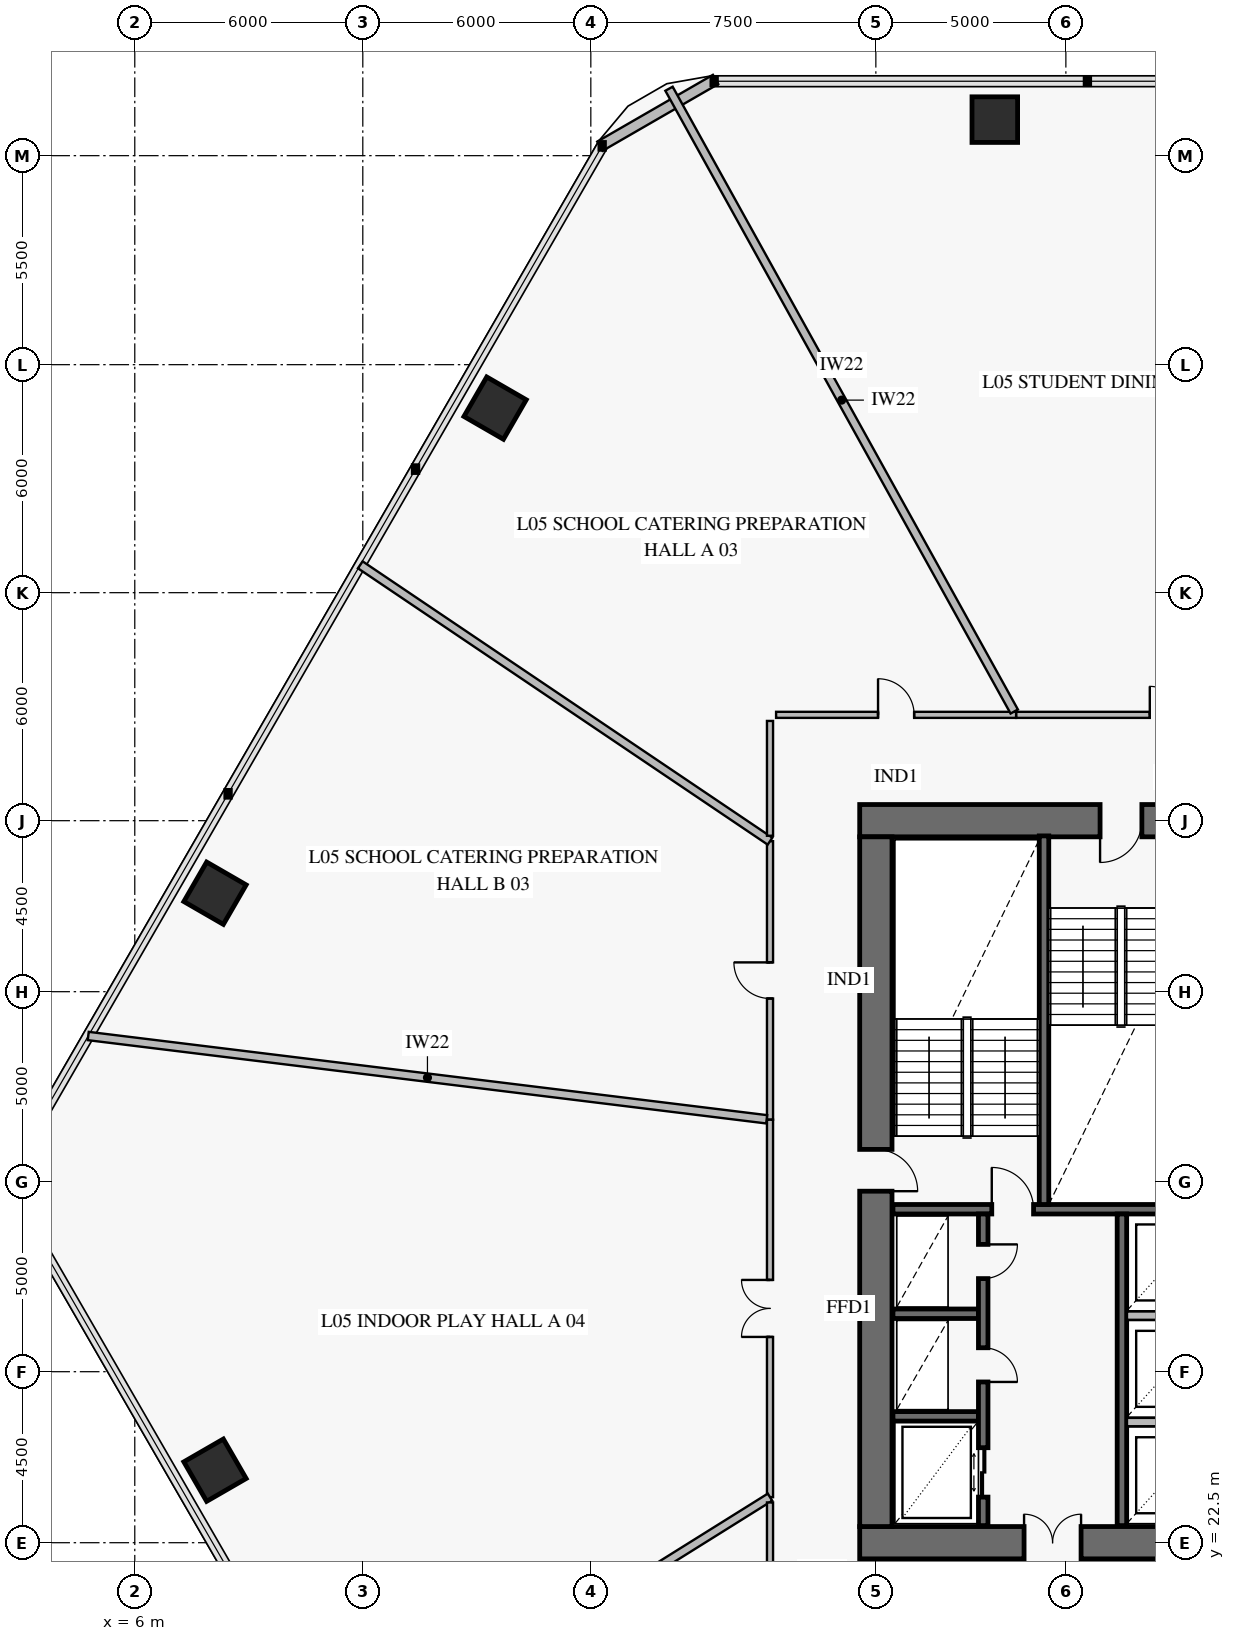
"""IFC4 building model, lengths in metres.
Left out: names, types, materials, properties, quantities, classifications, styles, units other than length and angle.
Written with IfcOpenShell. Run it as: python <this file> out.ifc"""

import sys

from ifc_helpers import new_model, si_unit, direction, frame, frame_2d, origin, origin_2d, place, context, subcontext, project, spatial, rectangle, extrude, element, fill, save


model = new_model("IFC4")
c1 = context("Model", 3, precision=1e-05, world=origin(), true_north=direction((0.0, 1.0)))
c2 = subcontext(c1, "Body", "Model", "MODEL_VIEW")
j1 = project(units=[si_unit("LENGTHUNIT", "METRE"), si_unit("PLANEANGLEUNIT", "RADIAN")], contexts=[c1])
p1 = place(None, origin())
s1 = spatial("IfcSite", under=j1, at=p1, CompositionType="ELEMENT")
p2 = place(p1, origin())
s2 = spatial("IfcBuilding", under=s1, at=p2, CompositionType="ELEMENT")
p3 = place(p2, frame((0.0, 0.0, 20.4)))
s3 = spatial("IfcBuildingStorey", under=s2, at=p3, CompositionType="ELEMENT", Elevation=20.4)
p4 = place(p3, frame((25.075, 22.5, 0.0), z_axis=(0.0, 0.0, 1.0), x_axis=(1.0, 0.0, 0.0)))
e1 = element("IfcWall", 1, at=p4, inside=s3, PredefinedType="SHEAR", context=c2, shape_type="SweptSolid", body=[
    extrude(rectangle(XDim=9.975, YDim=0.85, at=frame_2d((4.988, 0.0))), origin(), (0.0, 0.0, 1.0), 4.2),
])
p5 = place(p4, frame((4.325, 0.0, 0.0)))
e2 = element("IfcOpeningElement", 2, at=p5, cuts=e1, PredefinedType="OPENING", context=c2, shape_type="SweptSolid", body=[
    extrude(rectangle(XDim=1.5, YDim=2.15, at=frame_2d((0.75, 1.075))), frame((0.0, 0.437, 0.0), z_axis=(0.0, -1.0, 0.0), x_axis=(1.0, 0.0, 0.0)), (0.0, 0.0, 1.0), 0.874),
])
p6 = place(p3, frame((36.75, 41.5, 0.0), z_axis=(0.0, 0.0, 1.0), x_axis=(-1.0, 0.0, 0.0)))
e3 = element("IfcWall", 3, at=p6, inside=s3, PredefinedType="SHEAR", context=c2, shape_type="SweptSolid", body=[
    extrude(rectangle(XDim=11.675, YDim=0.85, at=frame_2d((5.837, 0.0))), origin(), (0.0, 0.0, 1.0), 4.2),
])
p7 = place(p6, frame((4.25, 0.0, 0.0)))
e4 = element("IfcOpeningElement", 4, at=p7, cuts=e3, PredefinedType="OPENING", context=c2, shape_type="SweptSolid", body=[
    extrude(rectangle(XDim=1.1, YDim=2.15, at=frame_2d((0.55, 1.075))), frame((0.0, 0.437, 0.0), z_axis=(0.0, -1.0, 0.0), x_axis=(1.0, 0.0, 0.0)), (0.0, 0.0, 1.0), 0.874),
])
p8 = place(p3, frame((25.5, 22.925, 0.0), z_axis=(0.0, 0.0, 1.0), x_axis=(0.0, 1.0, 0.0)))
e5 = element("IfcWall", 5, at=p8, inside=s3, PredefinedType="SHEAR", context=c2, shape_type="SweptSolid", body=[
    extrude(rectangle(XDim=18.15, YDim=0.85, at=frame_2d((9.075, 0.0))), origin(), (0.0, 0.0, 1.0), 4.2),
])
p9 = place(p8, frame((8.825, 0.0, 0.0)))
e6 = element("IfcOpeningElement", 6, at=p9, cuts=e5, PredefinedType="OPENING", context=c2, shape_type="SweptSolid", body=[
    extrude(rectangle(XDim=1.1, YDim=2.15, at=frame_2d((0.55, 1.075))), frame((0.0, 0.437, 0.0), z_axis=(0.0, -1.0, 0.0), x_axis=(1.0, 0.0, 0.0)), (0.0, 0.0, 1.0), 0.874),
])
for number, where, z_axis, x_axis in (
    (7, (28.63, 59.948, 0.0), (0.0, 0.0, 1.0), (-1.0, 0.0, 0.0)),
    (8, (15.481, 52.357, 0.0), (0.0, 0.0, 1.0), (-0.5, -0.866, 0.0)),
    (9, (8.111, 39.592, 0.0), (0.0, 0.0, 1.0), (-0.5, -0.866, 0.0)),
    (10, (8.111, 24.408, 0.0), (0.0, 0.0, 1.0), (0.5, -0.866, 0.0)),
):
    element("IfcColumn", number, at=place(p3, frame(where, z_axis=z_axis, x_axis=x_axis)), inside=s3, PredefinedType="COLUMN", context=c2, shape_type="SweptSolid", body=[
        extrude(rectangle(XDim=1.2, YDim=1.2, at=origin_2d()), origin(), (0.0, 0.0, 1.0), 3.92),
    ])
p10 = place(p3, frame((18.239, 59.249, 0.0), z_axis=(0.0, 0.0, 1.0), x_axis=(0.866007452331, 0.500031091541, 0.0)))
e11 = element("IfcWall", 11, at=p10, inside=s3, PredefinedType="SOLIDWALL", context=c2, shape_type="SweptSolid", body=[
    extrude(rectangle(XDim=3.515, YDim=0.28, at=frame_2d((1.757, 0.0))), origin(), (0.0, 0.0, 1.0), 3.92),
])
p11 = place(p3, frame((25.95, 31.275, 0.0), z_axis=(0.0, 0.0, 1.0), x_axis=(1.0, 0.0, 0.0)))
e12 = element("IfcWall", 12, at=p11, inside=s3, PredefinedType="SOLIDWALL", context=c2, shape_type="SweptSolid", body=[
    extrude(rectangle(XDim=20.1, YDim=0.25, at=frame_2d((10.05, 0.0))), origin(), (0.0, 0.0, 1.0), 4.2),
])
p12 = place(p11, frame((2.6, 0.0, 0.0)))
e13 = element("IfcOpeningElement", 13, at=p12, cuts=e12, PredefinedType="OPENING", context=c2, shape_type="SweptSolid", body=[
    extrude(rectangle(XDim=1.1, YDim=2.15, at=frame_2d((0.55, 1.075))), frame((0.0, 0.137, 0.0), z_axis=(0.0, -1.0, 0.0), x_axis=(1.0, 0.0, 0.0)), (0.0, 0.0, 1.0), 0.274),
])
p13 = place(p11, frame((10.6, 0.0, 0.0)))
e14 = element("IfcOpeningElement", 14, at=p13, cuts=e12, PredefinedType="OPENING", context=c2, shape_type="SweptSolid", body=[
    extrude(rectangle(XDim=1.1, YDim=2.15, at=frame_2d((0.55, 1.075))), frame((0.0, 0.137, 0.0), z_axis=(0.0, -1.0, 0.0), x_axis=(1.0, 0.0, 0.0)), (0.0, 0.0, 1.0), 0.274),
])
p14 = place(p11, frame((16.35, 0.0, 0.0)))
e15 = element("IfcOpeningElement", 15, at=p14, cuts=e12, PredefinedType="OPENING", context=c2, shape_type="SweptSolid", body=[
    extrude(rectangle(XDim=1.1, YDim=2.15, at=frame_2d((0.55, 1.075))), frame((0.0, 0.137, 0.0), z_axis=(0.0, -1.0, 0.0), x_axis=(1.0, 0.0, 0.0)), (0.0, 0.0, 1.0), 0.274),
])
p15 = place(p3, frame((29.925, 31.4, 0.0), z_axis=(0.0, 0.0, 1.0), x_axis=(0.0, 1.0, 0.0)))
e16 = element("IfcWall", 16, at=p15, inside=s3, PredefinedType="SOLIDWALL", context=c2, shape_type="SweptSolid", body=[
    extrude(rectangle(XDim=9.7, YDim=0.25, at=frame_2d((4.85, 0.0))), origin(), (0.0, 0.0, 1.0), 4.2),
])
for number, where, z_axis, x_axis in (
    (17, (25.95, 25.825, 0.0), (0.0, 0.0, 1.0), (1.0, 0.0, 0.0)),
    (18, (25.95, 28.525, 0.0), (0.0, 0.0, 1.0), (1.0, 0.0, 0.0)),
):
    element("IfcWall", number, at=place(p3, frame(where, z_axis=z_axis, x_axis=x_axis)), inside=s3, PredefinedType="SOLIDWALL", context=c2, shape_type="SweptSolid", body=[
        extrude(rectangle(XDim=2.25, YDim=0.25, at=frame_2d((1.125, 0.0))), origin(), (0.0, 0.0, 1.0), 4.2),
    ])
p16 = place(p3, frame((28.325, 22.95, 0.0), z_axis=(0.0, 0.0, 1.0), x_axis=(0.0, 1.0, 0.0)))
e19 = element("IfcWall", 19, at=p16, inside=s3, PredefinedType="SOLIDWALL", context=c2, shape_type="SweptSolid", body=[
    extrude(rectangle(XDim=8.2, YDim=0.25, at=frame_2d((4.1, 0.0))), origin(), (0.0, 0.0, 1.0), 4.2),
])
p17 = place(p16, frame((0.75, 0.0, 0.0)))
e20 = element("IfcOpeningElement", 20, at=p17, cuts=e19, PredefinedType="OPENING", context=c2, shape_type="SweptSolid", body=[
    extrude(rectangle(XDim=1.3, YDim=2.3, at=frame_2d((0.65, 1.15))), frame((0.0, 0.137, 0.0), z_axis=(0.0, -1.0, 0.0), x_axis=(1.0, 0.0, 0.0)), (0.0, 0.0, 1.0), 0.274),
])
p18 = place(p16, frame((3.78, 0.0, 0.0)))
e21 = element("IfcOpeningElement", 21, at=p18, cuts=e19, PredefinedType="OPENING", context=c2, shape_type="SweptSolid", body=[
    extrude(rectangle(XDim=0.9, YDim=2.1, at=frame_2d((0.45, 1.05))), frame((0.0, 0.137, 0.0), z_axis=(0.0, -1.0, 0.0), x_axis=(1.0, 0.0, 0.0)), (0.0, 0.0, 1.0), 0.274),
])
p19 = place(p16, frame((6.5, 0.0, 0.0)))
e22 = element("IfcOpeningElement", 22, at=p19, cuts=e19, PredefinedType="OPENING", context=c2, shape_type="SweptSolid", body=[
    extrude(rectangle(XDim=0.9, YDim=2.1, at=frame_2d((0.45, 1.05))), frame((0.0, 0.137, 0.0), z_axis=(0.0, -1.0, 0.0), x_axis=(1.0, 0.0, 0.0)), (0.0, 0.0, 1.0), 0.274),
])
p20 = place(p3, frame((31.975, 22.95, 0.0), z_axis=(0.0, 0.0, 1.0), x_axis=(0.0, 1.0, 0.0)))
e23 = element("IfcWall", 23, at=p20, inside=s3, PredefinedType="SOLIDWALL", context=c2, shape_type="SweptSolid", body=[
    extrude(rectangle(XDim=8.2, YDim=0.25, at=frame_2d((4.1, 0.0))), origin(), (0.0, 0.0, 1.0), 4.2),
])
p21 = place(p3, frame((37.727, 44.285, 0.0), z_axis=(0.0, 0.0, 1.0), x_axis=(-1.0, 0.0, 0.0)))
e24 = element("IfcWall", 24, at=p21, inside=s3, PredefinedType="PARTITIONING", context=c2, shape_type="SweptSolid", body=[
    extrude(rectangle(XDim=8.536, YDim=0.16, at=frame_2d((4.268, 0.0))), origin(), (0.0, 0.0, 1.0), 3.22),
])
p22 = place(p21, frame((3.518, 0.0, 0.0)))
e25 = element("IfcOpeningElement", 25, at=p22, cuts=e24, PredefinedType="OPENING", context=c2, shape_type="SweptSolid", body=[
    extrude(rectangle(XDim=1.5, YDim=2.15, at=frame_2d((0.75, 1.075))), frame((0.0, 0.092, 0.0), z_axis=(0.0, -1.0, 0.0), x_axis=(1.0, 0.0, 0.0)), (0.0, 0.0, 1.0), 0.184),
])
p23 = place(p3, frame((29.19, 44.285, 0.0), z_axis=(0.0, 0.0, 1.0), x_axis=(-1.0, 0.0, 0.0)))
e26 = element("IfcWall", 26, at=p23, inside=s3, PredefinedType="PARTITIONING", context=c2, shape_type="SweptSolid", body=[
    extrude(rectangle(XDim=6.315, YDim=0.16, at=frame_2d((3.158, 0.0))), origin(), (0.0, 0.0, 1.0), 3.22),
])
p24 = place(p23, frame((2.683, 0.0, 0.0)))
e27 = element("IfcOpeningElement", 27, at=p24, cuts=e26, PredefinedType="OPENING", context=c2, shape_type="SweptSolid", body=[
    extrude(rectangle(XDim=0.95, YDim=2.1, at=frame_2d((0.475, 1.05))), frame((0.0, 0.092, 0.0), z_axis=(0.0, -1.0, 0.0), x_axis=(1.0, 0.0, 0.0)), (0.0, 0.0, 1.0), 0.184),
])
p25 = place(p3, frame((22.715, 40.961, 0.0), z_axis=(0.0, 0.0, 1.0), x_axis=(0.0, -1.0, 0.0)))
e28 = element("IfcWall", 28, at=p25, inside=s3, PredefinedType="PARTITIONING", context=c2, shape_type="SweptSolid", body=[
    extrude(rectangle(XDim=7.33, YDim=0.16, at=frame_2d((3.665, 0.0))), origin(), (0.0, 0.0, 1.0), 3.22),
])
p26 = place(p25, frame((3.19, 0.0, 0.0)))
e29 = element("IfcOpeningElement", 29, at=p26, cuts=e28, PredefinedType="OPENING", context=c2, shape_type="SweptSolid", body=[
    extrude(rectangle(XDim=0.95, YDim=2.1, at=frame_2d((0.475, 1.05))), frame((0.0, 0.092, 0.0), z_axis=(0.0, -1.0, 0.0), x_axis=(1.0, 0.0, 0.0)), (0.0, 0.0, 1.0), 0.184),
])
p27 = place(p3, frame((22.715, 33.631, 0.0), z_axis=(0.0, 0.0, 1.0), x_axis=(0.0, -1.0, 0.0)))
e30 = element("IfcWall", 30, at=p27, inside=s3, PredefinedType="PARTITIONING", context=c2, shape_type="SweptSolid", body=[
    extrude(rectangle(XDim=9.933, YDim=0.16, at=frame_2d((4.966, 0.0))), origin(), (0.0, 0.0, 1.0), 3.22),
])
p28 = place(p27, frame((4.216, 0.0, 0.0)))
e31 = element("IfcOpeningElement", 31, at=p28, cuts=e30, PredefinedType="OPENING", context=c2, shape_type="SweptSolid", body=[
    extrude(rectangle(XDim=1.5, YDim=2.15, at=frame_2d((0.75, 1.075))), frame((0.0, 0.092, 0.0), z_axis=(0.0, -1.0, 0.0), x_axis=(1.0, 0.0, 0.0)), (0.0, 0.0, 1.0), 0.184),
])
for number, where, z_axis, x_axis in (
    (32, (32.108, 25.675, 0.0), (0.0, 0.0, 1.0), (1.0, 0.0, 0.0)),
    (33, (32.108, 28.475, 0.0), (0.0, 0.0, 1.0), (1.0, 0.0, 0.0)),
):
    element("IfcWall", number, at=place(p3, frame(where, z_axis=z_axis, x_axis=x_axis)), inside=s3, PredefinedType="PARTITIONING", context=c2, shape_type="SweptSolid", body=[
        extrude(rectangle(XDim=2.284, YDim=0.22, at=frame_2d((1.142, 0.0))), origin(), (0.0, 0.0, 1.0), 3.92),
    ])
p29 = place(p3, frame((29.142, 44.373, 0.0), z_axis=(0.0, 0.0, 1.0), x_axis=(-0.484814111505, 0.874617217579, 0.0)))
e34 = element("IfcWall", 34, at=p29, inside=s3, PredefinedType="PARTITIONING", context=c2, shape_type="SweptSolid", body=[
    extrude(rectangle(XDim=18.738, YDim=0.22, at=frame_2d((9.369, 0.0))), origin(), (0.0, 0.0, 1.0), 3.17),
])
p30 = place(p3, frame((22.715, 40.961, 0.0), z_axis=(0.0, 0.0, 1.0), x_axis=(-0.829037316792, 0.559193282654, 0.0)))
e35 = element("IfcWall", 35, at=p30, inside=s3, PredefinedType="PARTITIONING", context=c2, shape_type="SweptSolid", body=[
    extrude(rectangle(XDim=13.005, YDim=0.22, at=frame_2d((6.502, 0.0))), origin(), (0.0, 0.0, 1.0), 3.17),
])
p31 = place(p3, frame((22.715, 44.125, 0.0), z_axis=(0.0, 0.0, 1.0), x_axis=(0.0, -1.0, 0.0)))
e36 = element("IfcWall", 36, at=p31, inside=s3, PredefinedType="PARTITIONING", context=c2, shape_type="SweptSolid", body=[
    extrude(rectangle(XDim=3.022, YDim=0.16, at=frame_2d((1.511, 0.0))), origin(), (0.0, 0.0, 1.0), 3.92),
])
p32 = place(p3, frame((22.627, 33.642, 0.0), z_axis=(0.0, 0.0, 1.0), x_axis=(-0.99254636489, 0.121867606624, 0.0)))
e37 = element("IfcWall", 37, at=p32, inside=s3, PredefinedType="PARTITIONING", context=c2, shape_type="SweptSolid", body=[
    extrude(rectangle(XDim=17.986, YDim=0.22, at=frame_2d((8.993, 0.0))), origin(), (0.0, 0.0, 1.0), 3.17),
])
p33 = place(p3, frame((22.715, 23.698, 0.0), z_axis=(0.0, 0.0, 1.0), x_axis=(-0.848051882484, -0.529913204794, 0.0)))
e38 = element("IfcWall", 38, at=p33, inside=s3, PredefinedType="PARTITIONING", context=c2, shape_type="SweptSolid", body=[
    extrude(rectangle(XDim=13.311, YDim=0.22, at=frame_2d((6.655, 0.0))), origin(), (0.0, 0.0, 1.0), 3.17),
])
p34 = place(p3, frame((22.715, 23.56, 0.0), z_axis=(0.0, 0.0, 1.0), x_axis=(0.0, -1.0, 0.0)))
e39 = element("IfcWall", 39, at=p34, inside=s3, PredefinedType="PARTITIONING", context=c2, shape_type="SweptSolid", body=[
    extrude(rectangle(XDim=3.685, YDim=0.16, at=frame_2d((1.842, 0.0))), origin(), (0.0, 0.0, 1.0), 3.92),
])
p35 = place(p9, frame((1.1, 0.0, 0.0), z_axis=(0.0, 0.0, 1.0), x_axis=(-1.0, 0.0, 0.0)))
e40 = element("IfcDoor", 40, at=p35, inside=s3, OperationType="SINGLE_SWING_RIGHT", PredefinedType="USERDEFINED", context=c2, shape_type="SweptSolid", body=[
    extrude(rectangle(XDim=1.1, YDim=2.15, at=frame_2d((0.55, 1.075))), frame((0.0, 0.025, 0.0), z_axis=(0.0, -1.0, 0.0), x_axis=(1.0, 0.0, 0.0)), (0.0, 0.0, 1.0), 0.05),
])
fill(e6, e40)
p36 = place(p7, origin())
e41 = element("IfcDoor", 41, at=p36, inside=s3, OperationType="SINGLE_SWING_RIGHT", PredefinedType="USERDEFINED", context=c2, shape_type="SweptSolid", body=[
    extrude(rectangle(XDim=1.1, YDim=2.15, at=frame_2d((0.55, 1.075))), frame((0.0, 0.025, 0.0), z_axis=(0.0, -1.0, 0.0), x_axis=(1.0, 0.0, 0.0)), (0.0, 0.0, 1.0), 0.05),
])
fill(e4, e41)
p37 = place(p5, origin())
e42 = element("IfcDoor", 42, at=p37, inside=s3, OperationType="DOUBLE_DOOR_SINGLE_SWING", PredefinedType="DOOR", context=c2, shape_type="SweptSolid", body=[
    extrude(rectangle(XDim=1.5, YDim=2.15, at=frame_2d((0.75, 1.075))), frame((0.0, 0.025, 0.0), z_axis=(0.0, -1.0, 0.0), x_axis=(1.0, 0.0, 0.0)), (0.0, 0.0, 1.0), 0.05),
])
fill(e2, e42)
p38 = place(p12, origin())
e43 = element("IfcDoor", 43, at=p38, inside=s3, OperationType="SINGLE_SWING_LEFT", PredefinedType="USERDEFINED", context=c2, shape_type="SweptSolid", body=[
    extrude(rectangle(XDim=1.1, YDim=2.15, at=frame_2d((0.55, 1.075))), frame((0.0, 0.025, 0.0), z_axis=(0.0, -1.0, 0.0), x_axis=(1.0, 0.0, 0.0)), (0.0, 0.0, 1.0), 0.05),
])
fill(e13, e43)
p39 = place(p17, frame((1.3, 0.0, 0.0), z_axis=(0.0, 0.0, 1.0), x_axis=(-1.0, 0.0, 0.0)))
e44 = element("IfcDoor", 44, at=p39, inside=s3, OperationType="DOUBLE_DOOR_SLIDING", PredefinedType="DOOR", context=c2, shape_type="SweptSolid", body=[
    extrude(rectangle(XDim=1.3, YDim=2.3, at=frame_2d((0.65, 1.15))), frame((0.0, 0.025, 0.0), z_axis=(0.0, -1.0, 0.0), x_axis=(1.0, 0.0, 0.0)), (0.0, 0.0, 1.0), 0.05),
])
fill(e20, e44)
p40 = place(p18, frame((0.9, 0.0, 0.0), z_axis=(0.0, 0.0, 1.0), x_axis=(-1.0, 0.0, 0.0)))
e45 = element("IfcDoor", 45, at=p40, inside=s3, OperationType="SINGLE_SWING_RIGHT", PredefinedType="DOOR", context=c2, shape_type="SweptSolid", body=[
    extrude(rectangle(XDim=0.9, YDim=2.1, at=frame_2d((0.45, 1.05))), frame((0.0, 0.025, 0.0), z_axis=(0.0, -1.0, 0.0), x_axis=(1.0, 0.0, 0.0)), (0.0, 0.0, 1.0), 0.05),
])
fill(e21, e45)
p41 = place(p19, frame((0.9, 0.0, 0.0), z_axis=(0.0, 0.0, 1.0), x_axis=(-1.0, 0.0, 0.0)))
e46 = element("IfcDoor", 46, at=p41, inside=s3, OperationType="SINGLE_SWING_LEFT", PredefinedType="DOOR", context=c2, shape_type="SweptSolid", body=[
    extrude(rectangle(XDim=0.9, YDim=2.1, at=frame_2d((0.45, 1.05))), frame((0.0, 0.025, 0.0), z_axis=(0.0, -1.0, 0.0), x_axis=(1.0, 0.0, 0.0)), (0.0, 0.0, 1.0), 0.05),
])
fill(e22, e46)
p42 = place(p22, frame((1.5, 0.0, 0.0), z_axis=(0.0, 0.0, 1.0), x_axis=(-1.0, 0.0, 0.0)))
e47 = element("IfcDoor", 47, at=p42, inside=s3, OperationType="DOUBLE_DOOR_SINGLE_SWING", PredefinedType="DOOR", context=c2, shape_type="SweptSolid", body=[
    extrude(rectangle(XDim=1.5, YDim=2.15, at=frame_2d((0.75, 1.075))), frame((0.0, 0.025, 0.0), z_axis=(0.0, -1.0, 0.0), x_axis=(1.0, 0.0, 0.0)), (0.0, 0.0, 1.0), 0.05),
])
fill(e25, e47)
p43 = place(p24, frame((0.95, 0.0, 0.0), z_axis=(0.0, 0.0, 1.0), x_axis=(-1.0, 0.0, 0.0)))
e48 = element("IfcDoor", 48, at=p43, inside=s3, OperationType="SINGLE_SWING_LEFT", PredefinedType="DOOR", context=c2, shape_type="SweptSolid", body=[
    extrude(rectangle(XDim=0.95, YDim=2.1, at=frame_2d((0.475, 1.05))), frame((0.0, 0.025, 0.0), z_axis=(0.0, -1.0, 0.0), x_axis=(1.0, 0.0, 0.0)), (0.0, 0.0, 1.0), 0.05),
])
fill(e27, e48)
p44 = place(p26, frame((0.95, 0.0, 0.0), z_axis=(0.0, 0.0, 1.0), x_axis=(-1.0, 0.0, 0.0)))
e49 = element("IfcDoor", 49, at=p44, inside=s3, OperationType="SINGLE_SWING_RIGHT", PredefinedType="DOOR", context=c2, shape_type="SweptSolid", body=[
    extrude(rectangle(XDim=0.95, YDim=2.1, at=frame_2d((0.475, 1.05))), frame((0.0, 0.025, 0.0), z_axis=(0.0, -1.0, 0.0), x_axis=(1.0, 0.0, 0.0)), (0.0, 0.0, 1.0), 0.05),
])
fill(e29, e49)
p45 = place(p28, frame((1.5, 0.0, 0.0), z_axis=(0.0, 0.0, 1.0), x_axis=(-1.0, 0.0, 0.0)))
e50 = element("IfcDoor", 50, at=p45, inside=s3, OperationType="DOUBLE_DOOR_SINGLE_SWING", PredefinedType="DOOR", context=c2, shape_type="SweptSolid", body=[
    extrude(rectangle(XDim=1.5, YDim=2.15, at=frame_2d((0.75, 1.075))), frame((0.0, 0.025, 0.0), z_axis=(0.0, -1.0, 0.0), x_axis=(1.0, 0.0, 0.0)), (0.0, 0.0, 1.0), 0.05),
])
fill(e31, e50)
save(model, sys.argv[1])
